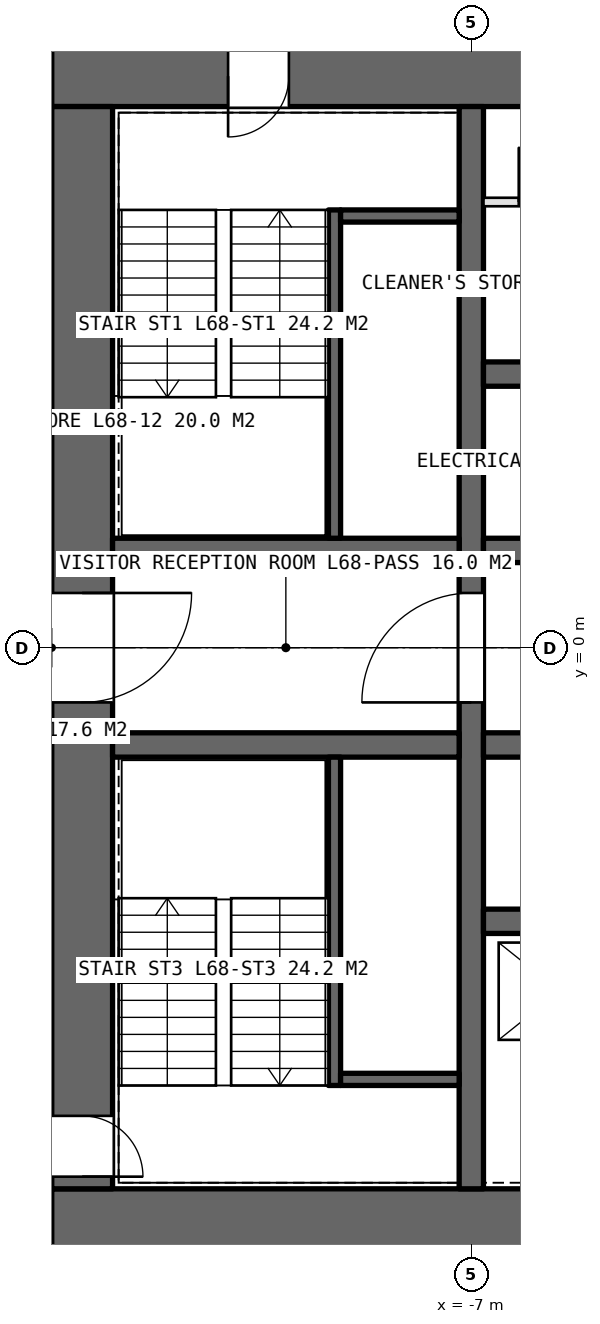
"""IFC4 building model, lengths in metres.
Left out: names, types, materials, properties, quantities, classifications, styles, units other than length and angle.
Written with IfcOpenShell. Run it as: python <this file> out.ifc"""

import sys

from ifc_helpers import new_model, si_unit, direction, frame, frame_2d, origin, place, context, subcontext, project, spatial, rectangle, extrude, element, fill, save


model = new_model("IFC4")
c1 = context("Model", 3, precision=1e-05, world=origin(), true_north=direction((0.0, 1.0)))
c2 = subcontext(c1, "Body", "Model", "MODEL_VIEW")
j1 = project(units=[si_unit("LENGTHUNIT", "METRE"), si_unit("PLANEANGLEUNIT", "RADIAN")], contexts=[c1])
p1 = place(None, origin())
s1 = spatial("IfcSite", under=j1, at=p1, CompositionType="ELEMENT")
p2 = place(p1, origin())
s2 = spatial("IfcBuilding", under=s1, at=p2, CompositionType="ELEMENT")
p3 = place(p2, frame((0.0, 0.0, 304.8)))
s3 = spatial("IfcBuildingStorey", under=s2, at=p3, CompositionType="ELEMENT", Elevation=304.8)
p4 = place(p3, frame((-13.9, -9.4, 0.0), z_axis=(0.0, 0.0, 1.0), x_axis=(1.0, 0.0, 0.0)))
e1 = element("IfcWall", 1, at=p4, inside=s3, PredefinedType="SHEAR", context=c2, shape_type="SweptSolid", body=[
    extrude(rectangle(XDim=27.8, YDim=1.0, at=frame_2d((13.9, 0.0))), origin(), (0.0, 0.0, 1.0), 4.2),
])
p5 = place(p4, frame((22.95, 0.0, 0.0)))
e2 = element("IfcOpeningElement", 2, at=p5, cuts=e1, PredefinedType="OPENING", context=c2, shape_type="SweptSolid", body=[
    extrude(rectangle(XDim=2.2, YDim=2.7, at=frame_2d((1.1, 1.35))), frame((0.0, 0.51, 0.0), z_axis=(0.0, -1.0, 0.0), x_axis=(1.0, 0.0, 0.0)), (0.0, 0.0, 1.0), 1.02),
])
p6 = place(p3, frame((13.9, 9.4, 0.0), z_axis=(0.0, 0.0, 1.0), x_axis=(-1.0, 0.0, 0.0)))
e3 = element("IfcWall", 3, at=p6, inside=s3, PredefinedType="SHEAR", context=c2, shape_type="SweptSolid", body=[
    extrude(rectangle(XDim=27.8, YDim=1.0, at=frame_2d((13.9, 0.0))), origin(), (0.0, 0.0, 1.0), 4.2),
])
p7 = place(p6, frame((23.9, 0.0, 0.0)))
e4 = element("IfcOpeningElement", 4, at=p7, cuts=e3, PredefinedType="OPENING", context=c2, shape_type="SweptSolid", body=[
    extrude(rectangle(XDim=1.0, YDim=2.4, at=frame_2d((0.5, 1.2))), frame((0.0, 0.51, 0.0), z_axis=(0.0, -1.0, 0.0), x_axis=(1.0, 0.0, 0.0)), (0.0, 0.0, 1.0), 1.02),
])
p8 = place(p6, frame((13.0, 0.0, 0.0)))
e5 = element("IfcOpeningElement", 5, at=p8, cuts=e3, PredefinedType="OPENING", context=c2, shape_type="SweptSolid", body=[
    extrude(rectangle(XDim=1.8, YDim=2.4, at=frame_2d((0.9, 1.2))), frame((0.0, 0.51, 0.0), z_axis=(0.0, -1.0, 0.0), x_axis=(1.0, 0.0, 0.0)), (0.0, 0.0, 1.0), 1.02),
])
p9 = place(p3, frame((-13.4, 8.9, 0.0), z_axis=(0.0, 0.0, 1.0), x_axis=(0.0, -1.0, 0.0)))
e6 = element("IfcWall", 6, at=p9, inside=s3, PredefinedType="SHEAR", context=c2, shape_type="SweptSolid", body=[
    extrude(rectangle(XDim=17.8, YDim=1.0, at=frame_2d((8.9, 0.0))), origin(), (0.0, 0.0, 1.0), 4.2),
])
p10 = place(p9, frame((8.0, 0.0, 0.0)))
e7 = element("IfcOpeningElement", 7, at=p10, cuts=e6, PredefinedType="OPENING", context=c2, shape_type="SweptSolid", body=[
    extrude(rectangle(XDim=1.8, YDim=2.4, at=frame_2d((0.9, 1.2))), frame((0.0, 0.51, 0.0), z_axis=(0.0, -1.0, 0.0), x_axis=(1.0, 0.0, 0.0)), (0.0, 0.0, 1.0), 1.02),
])
p11 = place(p9, frame((16.6, 0.0, 0.0)))
e8 = element("IfcOpeningElement", 8, at=p11, cuts=e6, PredefinedType="OPENING", context=c2, shape_type="SweptSolid", body=[
    extrude(rectangle(XDim=1.0, YDim=2.4, at=frame_2d((0.5, 1.2))), frame((0.0, 0.51, 0.0), z_axis=(0.0, -1.0, 0.0), x_axis=(1.0, 0.0, 0.0)), (0.0, 0.0, 1.0), 1.02),
])
p12 = place(p3, frame((-7.0, -8.9, 0.0), z_axis=(0.0, 0.0, 1.0), x_axis=(0.0, 1.0, 0.0)))
e9 = element("IfcWall", 9, at=p12, inside=s3, PredefinedType="SHEAR", context=c2, shape_type="SweptSolid", body=[
    extrude(rectangle(XDim=17.8, YDim=0.4, at=frame_2d((8.9, 0.0))), origin(), (0.0, 0.0, 1.0), 4.2),
])
p13 = place(p12, frame((8.0, 0.0, 0.0)))
e10 = element("IfcOpeningElement", 10, at=p13, cuts=e9, PredefinedType="OPENING", context=c2, shape_type="SweptSolid", body=[
    extrude(rectangle(XDim=1.8, YDim=2.4, at=frame_2d((0.9, 1.2))), frame((0.0, 0.21, 0.0), z_axis=(0.0, -1.0, 0.0), x_axis=(1.0, 0.0, 0.0)), (0.0, 0.0, 1.0), 0.42),
])
p14 = place(p3, frame((-6.8, 1.6, 0.0), z_axis=(0.0, 0.0, 1.0), x_axis=(1.0, 0.0, 0.0)))
e11 = element("IfcWall", 11, at=p14, inside=s3, PredefinedType="SHEAR", context=c2, shape_type="SweptSolid", body=[
    extrude(rectangle(XDim=13.6, YDim=0.4, at=frame_2d((6.8, 0.0))), origin(), (0.0, 0.0, 1.0), 4.2),
])
p15 = place(p14, frame((1.265, 0.0, 0.0)))
e12 = element("IfcOpeningElement", 12, at=p15, cuts=e11, PredefinedType="OPENING", context=c2, shape_type="SweptSolid", body=[
    extrude(rectangle(XDim=1.0, YDim=2.4, at=frame_2d((0.5, 1.2))), frame((0.0, 0.21, 0.0), z_axis=(0.0, -1.0, 0.0), x_axis=(1.0, 0.0, 0.0)), (0.0, 0.0, 1.0), 0.42),
])
p16 = place(p14, frame((4.0, 0.0, 0.0)))
e13 = element("IfcOpeningElement", 13, at=p16, cuts=e11, PredefinedType="OPENING", context=c2, shape_type="SweptSolid", body=[
    extrude(rectangle(XDim=1.0, YDim=2.4, at=frame_2d((0.5, 1.2))), frame((0.0, 0.21, 0.0), z_axis=(0.0, -1.0, 0.0), x_axis=(1.0, 0.0, 0.0)), (0.0, 0.0, 1.0), 0.42),
])
p17 = place(p14, frame((7.635, 0.0, 0.0)))
e14 = element("IfcOpeningElement", 14, at=p17, cuts=e11, PredefinedType="OPENING", context=c2, shape_type="SweptSolid", body=[
    extrude(rectangle(XDim=1.0, YDim=2.4, at=frame_2d((0.5, 1.2))), frame((0.0, 0.21, 0.0), z_axis=(0.0, -1.0, 0.0), x_axis=(1.0, 0.0, 0.0)), (0.0, 0.0, 1.0), 0.42),
])
p18 = place(p14, frame((11.9, 0.0, 0.0)))
e15 = element("IfcOpeningElement", 15, at=p18, cuts=e11, PredefinedType="OPENING", context=c2, shape_type="SweptSolid", body=[
    extrude(rectangle(XDim=1.0, YDim=2.4, at=frame_2d((0.5, 1.2))), frame((0.0, 0.21, 0.0), z_axis=(0.0, -1.0, 0.0), x_axis=(1.0, 0.0, 0.0)), (0.0, 0.0, 1.0), 0.42),
])
p19 = place(p3, frame((-6.8, -1.6, 0.0), z_axis=(0.0, 0.0, 1.0), x_axis=(1.0, 0.0, 0.0)))
e16 = element("IfcWall", 16, at=p19, inside=s3, PredefinedType="SHEAR", context=c2, shape_type="SweptSolid", body=[
    extrude(rectangle(XDim=13.6, YDim=0.4, at=frame_2d((6.8, 0.0))), origin(), (0.0, 0.0, 1.0), 4.2),
])
p20 = place(p19, frame((11.9, 0.0, 0.0)))
e17 = element("IfcOpeningElement", 17, at=p20, cuts=e16, PredefinedType="OPENING", context=c2, shape_type="SweptSolid", body=[
    extrude(rectangle(XDim=1.0, YDim=2.4, at=frame_2d((0.5, 1.2))), frame((0.0, 0.21, 0.0), z_axis=(0.0, -1.0, 0.0), x_axis=(1.0, 0.0, 0.0)), (0.0, 0.0, 1.0), 0.42),
])
p21 = place(p19, frame((4.5, 0.0, 0.0)))
e18 = element("IfcOpeningElement", 18, at=p21, cuts=e16, PredefinedType="OPENING", context=c2, shape_type="SweptSolid", body=[
    extrude(rectangle(XDim=1.8, YDim=2.4, at=frame_2d((0.9, 1.2))), frame((0.0, 0.21, 0.0), z_axis=(0.0, -1.0, 0.0), x_axis=(1.0, 0.0, 0.0)), (0.0, 0.0, 1.0), 0.42),
])
p22 = place(p3, frame((-6.8, 4.5, 0.0), z_axis=(0.0, 0.0, 1.0), x_axis=(1.0, 0.0, 0.0)))
e19 = element("IfcWall", 19, at=p22, inside=s3, PredefinedType="SHEAR", context=c2, shape_type="SweptSolid", body=[
    extrude(rectangle(XDim=13.6, YDim=0.4, at=frame_2d((6.8, 0.0))), origin(), (0.0, 0.0, 1.0), 4.2),
])
p23 = place(p3, frame((-6.8, -4.5, 0.0), z_axis=(0.0, 0.0, 1.0), x_axis=(1.0, 0.0, 0.0)))
e20 = element("IfcWall", 20, at=p23, inside=s3, PredefinedType="SHEAR", context=c2, shape_type="SweptSolid", body=[
    extrude(rectangle(XDim=13.6, YDim=0.4, at=frame_2d((6.8, 0.0))), origin(), (0.0, 0.0, 1.0), 4.2),
])
p24 = place(p23, frame((0.7, 0.0, 0.0)))
e21 = element("IfcOpeningElement", 21, at=p24, cuts=e20, PredefinedType="OPENING", context=c2, shape_type="SweptSolid", body=[
    extrude(rectangle(XDim=1.1, YDim=2.4, at=frame_2d((0.55, 1.2))), frame((0.0, 0.21, 0.0), z_axis=(0.0, -1.0, 0.0), x_axis=(1.0, 0.0, 0.0)), (0.0, 0.0, 1.0), 0.42),
])
p25 = place(p23, frame((3.5, 0.0, 0.0)))
e22 = element("IfcOpeningElement", 22, at=p25, cuts=e20, PredefinedType="OPENING", context=c2, shape_type="SweptSolid", body=[
    extrude(rectangle(XDim=1.1, YDim=2.4, at=frame_2d((0.55, 1.2))), frame((0.0, 0.21, 0.0), z_axis=(0.0, -1.0, 0.0), x_axis=(1.0, 0.0, 0.0)), (0.0, 0.0, 1.0), 0.42),
])
p26 = place(p23, frame((6.3, 0.0, 0.0)))
e23 = element("IfcOpeningElement", 23, at=p26, cuts=e20, PredefinedType="OPENING", context=c2, shape_type="SweptSolid", body=[
    extrude(rectangle(XDim=1.1, YDim=2.4, at=frame_2d((0.55, 1.2))), frame((0.0, 0.21, 0.0), z_axis=(0.0, -1.0, 0.0), x_axis=(1.0, 0.0, 0.0)), (0.0, 0.0, 1.0), 0.42),
])
p27 = place(p23, frame((9.1, 0.0, 0.0)))
e24 = element("IfcOpeningElement", 24, at=p27, cuts=e20, PredefinedType="OPENING", context=c2, shape_type="SweptSolid", body=[
    extrude(rectangle(XDim=1.1, YDim=2.4, at=frame_2d((0.55, 1.2))), frame((0.0, 0.21, 0.0), z_axis=(0.0, -1.0, 0.0), x_axis=(1.0, 0.0, 0.0)), (0.0, 0.0, 1.0), 0.42),
])
for number, where, z_axis, x_axis in (
    (25, (-12.9, 1.6, 0.0), (0.0, 0.0, 1.0), (1.0, 0.0, 0.0)),
    (26, (-12.9, -1.6, 0.0), (0.0, 0.0, 1.0), (1.0, 0.0, 0.0)),
):
    element("IfcWall", number, at=place(p3, frame(where, z_axis=z_axis, x_axis=x_axis)), inside=s3, PredefinedType="SHEAR", context=c2, shape_type="SweptSolid", body=[
        extrude(rectangle(XDim=5.7, YDim=0.4, at=frame_2d((2.85, 0.0))), origin(), (0.0, 0.0, 1.0), 4.2),
    ])
p28 = place(p3, frame((-6.8, 7.33, 0.0), z_axis=(0.0, 0.0, 1.0), x_axis=(1.0, 0.0, 0.0)))
e27 = element("IfcWall", 27, at=p28, inside=s3, PredefinedType="PARTITIONING", context=c2, shape_type="SweptSolid", body=[
    extrude(rectangle(XDim=13.6, YDim=0.14, at=frame_2d((6.8, 0.0))), origin(), (0.0, 0.0, 1.0), 3.95),
])
p29 = place(p28, frame((0.58, 0.0, 0.0)))
e28 = element("IfcOpeningElement", 28, at=p29, cuts=e27, PredefinedType="OPENING", context=c2, shape_type="SweptSolid", body=[
    extrude(rectangle(XDim=0.9, YDim=2.4, at=frame_2d((0.45, 1.2))), frame((0.0, 0.08, 0.0), z_axis=(0.0, -1.0, 0.0), x_axis=(1.0, 0.0, 0.0)), (0.0, 0.0, 1.0), 0.16),
])
p30 = place(p28, frame((4.38, 0.0, 0.0)))
e29 = element("IfcOpeningElement", 29, at=p30, cuts=e27, PredefinedType="OPENING", context=c2, shape_type="SweptSolid", body=[
    extrude(rectangle(XDim=1.1, YDim=2.4, at=frame_2d((0.55, 1.2))), frame((0.0, 0.08, 0.0), z_axis=(0.0, -1.0, 0.0), x_axis=(1.0, 0.0, 0.0)), (0.0, 0.0, 1.0), 0.16),
])
p31 = place(p28, frame((9.08, 0.0, 0.0)))
e30 = element("IfcOpeningElement", 30, at=p31, cuts=e27, PredefinedType="OPENING", context=c2, shape_type="SweptSolid", body=[
    extrude(rectangle(XDim=1.0, YDim=2.4, at=frame_2d((0.5, 1.2))), frame((0.0, 0.08, 0.0), z_axis=(0.0, -1.0, 0.0), x_axis=(1.0, 0.0, 0.0)), (0.0, 0.0, 1.0), 0.16),
])
p32 = place(p28, frame((12.35, 0.0, 0.0)))
e31 = element("IfcOpeningElement", 31, at=p32, cuts=e27, PredefinedType="OPENING", context=c2, shape_type="SweptSolid", body=[
    extrude(rectangle(XDim=1.0, YDim=2.4, at=frame_2d((0.5, 1.2))), frame((0.0, 0.08, 0.0), z_axis=(0.0, -1.0, 0.0), x_axis=(1.0, 0.0, 0.0)), (0.0, 0.0, 1.0), 0.16),
])
p33 = place(p3, frame((-9.25, 7.2, 0.0), z_axis=(0.0, 0.0, 1.0), x_axis=(0.0, -1.0, 0.0)))
e32 = element("IfcWall", 32, at=p33, inside=s3, PredefinedType="SOLIDWALL", context=c2, shape_type="SweptSolid", body=[
    extrude(rectangle(XDim=5.4, YDim=0.2, at=frame_2d((2.7, 0.0))), origin(), (0.0, 0.0, 1.0), 4.2),
])
p34 = place(p3, frame((-9.15, 7.1, 0.0), z_axis=(0.0, 0.0, 1.0), x_axis=(1.0, 0.0, 0.0)))
e33 = element("IfcWall", 33, at=p34, inside=s3, PredefinedType="SOLIDWALL", context=c2, shape_type="SweptSolid", body=[
    extrude(rectangle(XDim=1.95, YDim=0.2, at=frame_2d((0.975, 0.0))), origin(), (0.0, 0.0, 1.0), 4.2),
])
p35 = place(p3, frame((-9.25, -7.2, 0.0), z_axis=(0.0, 0.0, 1.0), x_axis=(0.0, 1.0, 0.0)))
e34 = element("IfcWall", 34, at=p35, inside=s3, PredefinedType="SOLIDWALL", context=c2, shape_type="SweptSolid", body=[
    extrude(rectangle(XDim=5.4, YDim=0.2, at=frame_2d((2.7, 0.0))), origin(), (0.0, 0.0, 1.0), 4.2),
])
p36 = place(p3, frame((-9.15, -7.1, 0.0), z_axis=(0.0, 0.0, 1.0), x_axis=(1.0, 0.0, 0.0)))
e35 = element("IfcWall", 35, at=p36, inside=s3, PredefinedType="SOLIDWALL", context=c2, shape_type="SweptSolid", body=[
    extrude(rectangle(XDim=1.95, YDim=0.2, at=frame_2d((0.975, 0.0))), origin(), (0.0, 0.0, 1.0), 4.2),
])
p37 = place(p10, origin())
e36 = element("IfcDoor", 36, at=p37, inside=s3, OperationType="DOUBLE_DOOR_SINGLE_SWING", PredefinedType="DOOR", context=c2, shape_type="SweptSolid", body=[
    extrude(rectangle(XDim=1.8, YDim=2.4, at=frame_2d((0.9, 1.2))), frame((0.0, 0.025, 0.0), z_axis=(0.0, -1.0, 0.0), x_axis=(1.0, 0.0, 0.0)), (0.0, 0.0, 1.0), 0.05),
])
fill(e7, e36)
p38 = place(p13, origin())
e37 = element("IfcDoor", 37, at=p38, inside=s3, OperationType="DOUBLE_DOOR_SINGLE_SWING", PredefinedType="DOOR", context=c2, shape_type="SweptSolid", body=[
    extrude(rectangle(XDim=1.8, YDim=2.4, at=frame_2d((0.9, 1.2))), frame((0.0, 0.025, 0.0), z_axis=(0.0, -1.0, 0.0), x_axis=(1.0, 0.0, 0.0)), (0.0, 0.0, 1.0), 0.05),
])
fill(e10, e37)
p39 = place(p7, origin())
e38 = element("IfcDoor", 38, at=p39, inside=s3, OperationType="SINGLE_SWING_RIGHT", PredefinedType="DOOR", context=c2, shape_type="SweptSolid", body=[
    extrude(rectangle(XDim=1.0, YDim=2.4, at=frame_2d((0.5, 1.2))), frame((0.0, 0.025, 0.0), z_axis=(0.0, -1.0, 0.0), x_axis=(1.0, 0.0, 0.0)), (0.0, 0.0, 1.0), 0.05),
])
fill(e4, e38)
p40 = place(p11, origin())
e39 = element("IfcDoor", 39, at=p40, inside=s3, OperationType="SINGLE_SWING_RIGHT", PredefinedType="DOOR", context=c2, shape_type="SweptSolid", body=[
    extrude(rectangle(XDim=1.0, YDim=2.4, at=frame_2d((0.5, 1.2))), frame((0.0, 0.025, 0.0), z_axis=(0.0, -1.0, 0.0), x_axis=(1.0, 0.0, 0.0)), (0.0, 0.0, 1.0), 0.05),
])
fill(e8, e39)
p41 = place(p29, origin())
e40 = element("IfcDoor", 40, at=p41, inside=s3, OperationType="SINGLE_SWING_LEFT", PredefinedType="DOOR", context=c2, shape_type="SweptSolid", body=[
    extrude(rectangle(XDim=0.9, YDim=2.4, at=frame_2d((0.45, 1.2))), frame((0.0, 0.025, 0.0), z_axis=(0.0, -1.0, 0.0), x_axis=(1.0, 0.0, 0.0)), (0.0, 0.0, 1.0), 0.05),
])
fill(e28, e40)
save(model, sys.argv[1])
